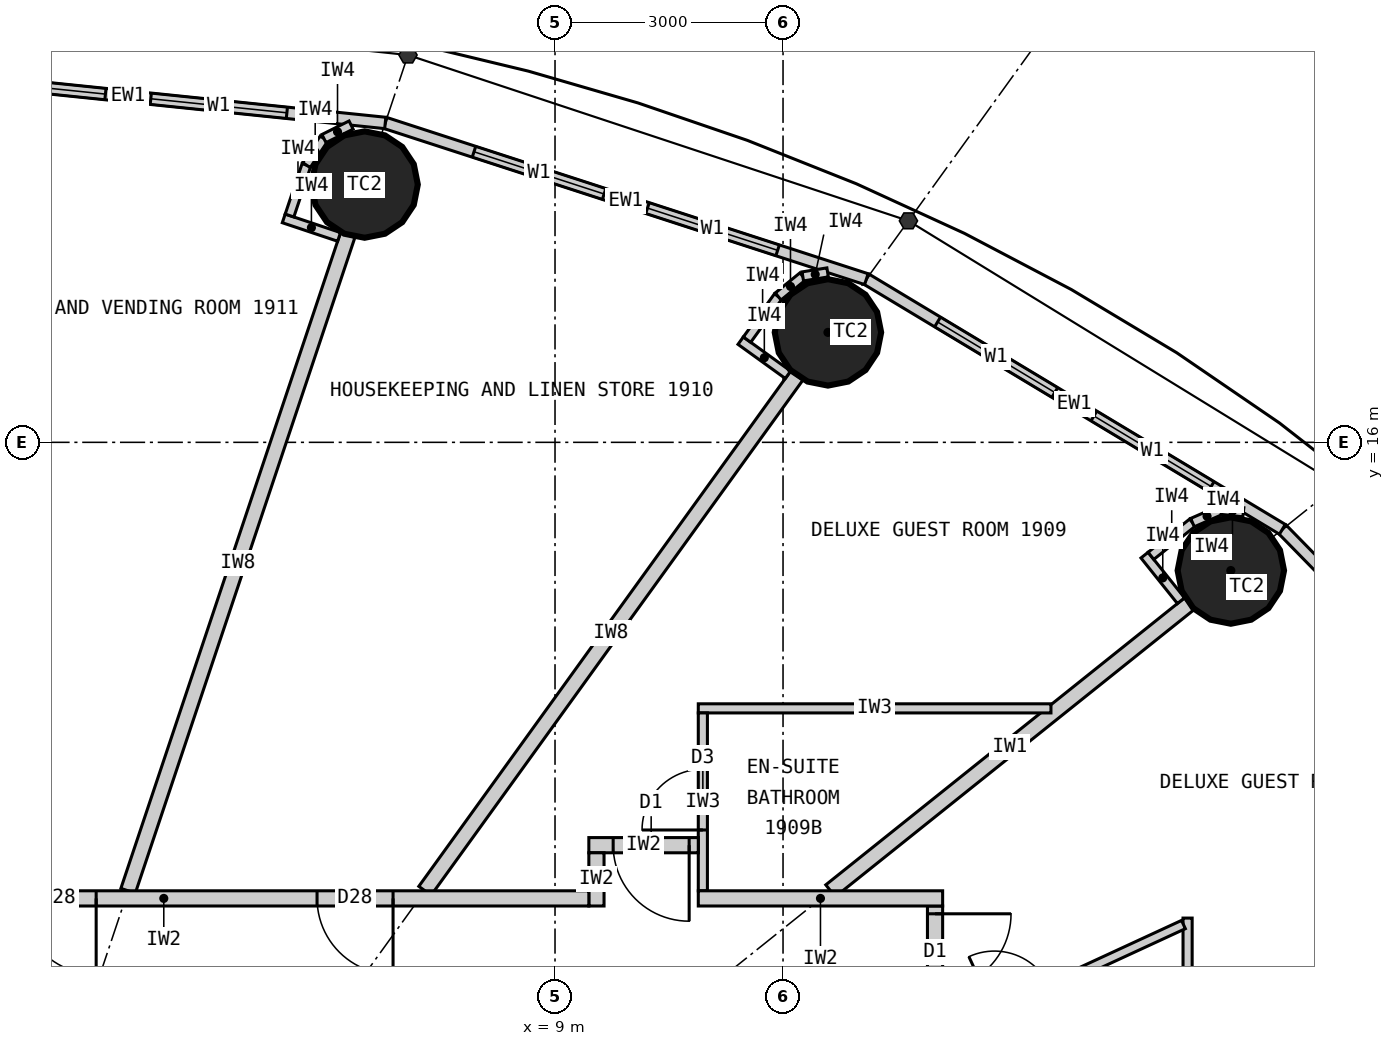
"""IFC4 building model, lengths in metres.
Left out: names, types, materials, properties, quantities, classifications, styles, units other than length and angle.
Written with IfcOpenShell. Run it as: python <this file> out.ifc"""

import sys

from ifc_helpers import new_model, si_unit, direction, frame, frame_2d, origin, origin_2d, place, context, subcontext, project, spatial, rectangle, circle, extrude, element, fill, save


model = new_model("IFC4")
c1 = context("Model", 3, precision=1e-05, world=origin(), true_north=direction((0.0, 1.0)))
c2 = subcontext(c1, "Body", "Model", "MODEL_VIEW")
j1 = project(units=[si_unit("LENGTHUNIT", "METRE"), si_unit("PLANEANGLEUNIT", "RADIAN")], contexts=[c1])
p1 = place(None, origin())
s1 = spatial("IfcSite", under=j1, at=p1, CompositionType="ELEMENT")
p2 = place(p1, origin())
s2 = spatial("IfcBuilding", under=s1, at=p2, CompositionType="ELEMENT")
p3 = place(p2, frame((0.0, 0.0, 77.1)))
s3 = spatial("IfcBuildingStorey", under=s2, at=p3, CompositionType="ELEMENT", Elevation=77.1)
for number, where, z_axis, x_axis in (
    (1, (17.892, 14.313, 0.0), (0.0, 0.0, 1.0), (1.0, 0.0, 0.0)),
    (2, (12.591, 17.447, 0.0), (0.0, 0.0, 1.0), (1.0, 0.0, 0.0)),
    (3, (6.495, 19.391, 0.0), (0.0, 0.0, 1.0), (1.0, 0.0, 0.0)),
):
    element("IfcColumn", number, at=place(p3, frame(where, z_axis=z_axis, x_axis=x_axis)), inside=s3, PredefinedType="COLUMN", context=c2, shape_type="SweptSolid", body=[
        extrude(circle(Radius=0.7, at=origin_2d()), origin(), (0.0, 0.0, 1.0), 3.3),
    ])
p4 = place(p3, frame((22.803, 10.532, 0.0), z_axis=(0.0, 0.0, 1.0), x_axis=(-0.699602905915, 0.714531856557, 0.0)))
e4 = element("IfcWall", 4, at=p4, inside=s3, PredefinedType="ELEMENTEDWALL", context=c2, shape_type="SweptSolid", body=[
    extrude(rectangle(XDim=6.051, YDim=0.15, at=frame_2d((3.025, 0.0))), origin(), (0.0, 0.0, 1.0), 3.12),
])
p5 = place(p4, frame((0.926, 0.0, 0.9)))
e5 = element("IfcOpeningElement", 5, at=p5, cuts=e4, PredefinedType="OPENING", context=c2, shape_type="SweptSolid", body=[
    extrude(rectangle(XDim=1.8, YDim=1.9, at=frame_2d((0.9, 0.95))), frame((0.0, 0.085, 0.0), z_axis=(0.0, -1.0, 0.0), x_axis=(1.0, 0.0, 0.0)), (0.0, 0.0, 1.0), 0.17),
])
p6 = place(p4, frame((3.325, 0.0, 0.9)))
e6 = element("IfcOpeningElement", 6, at=p6, cuts=e4, PredefinedType="OPENING", context=c2, shape_type="SweptSolid", body=[
    extrude(rectangle(XDim=1.8, YDim=1.9, at=frame_2d((0.9, 0.95))), frame((0.0, 0.085, 0.0), z_axis=(0.0, -1.0, 0.0), x_axis=(1.0, 0.0, 0.0)), (0.0, 0.0, 1.0), 0.17),
])
p7 = place(p3, frame((18.57, 14.856, 0.0), z_axis=(0.0, 0.0, 1.0), x_axis=(-0.856983180864, 0.515344377787, 0.0)))
e7 = element("IfcWall", 7, at=p7, inside=s3, PredefinedType="ELEMENTEDWALL", context=c2, shape_type="SweptSolid", body=[
    extrude(rectangle(XDim=6.386, YDim=0.15, at=frame_2d((3.193, 0.0))), origin(), (0.0, 0.0, 1.0), 3.12),
])
p8 = place(p7, frame((1.093, 0.0, 0.9)))
e8 = element("IfcOpeningElement", 8, at=p8, cuts=e7, PredefinedType="OPENING", context=c2, shape_type="SweptSolid", body=[
    extrude(rectangle(XDim=1.8, YDim=1.9, at=frame_2d((0.9, 0.95))), frame((0.0, 0.085, 0.0), z_axis=(0.0, -1.0, 0.0), x_axis=(1.0, 0.0, 0.0)), (0.0, 0.0, 1.0), 0.17),
])
p9 = place(p7, frame((3.493, 0.0, 0.9)))
e9 = element("IfcOpeningElement", 9, at=p9, cuts=e7, PredefinedType="OPENING", context=c2, shape_type="SweptSolid", body=[
    extrude(rectangle(XDim=1.8, YDim=1.9, at=frame_2d((0.9, 0.95))), frame((0.0, 0.085, 0.0), z_axis=(0.0, -1.0, 0.0), x_axis=(1.0, 0.0, 0.0)), (0.0, 0.0, 1.0), 0.17),
])
p10 = place(p3, frame((13.096, 18.147, 0.0), z_axis=(0.0, 0.0, 1.0), x_axis=(-0.951137534625, 0.308767534285, 0.0)))
e10 = element("IfcWall", 10, at=p10, inside=s3, PredefinedType="ELEMENTEDWALL", context=c2, shape_type="SweptSolid", body=[
    extrude(rectangle(XDim=6.655, YDim=0.15, at=frame_2d((3.328, 0.0))), origin(), (0.0, 0.0, 1.0), 3.12),
])
p11 = place(p10, frame((1.228, 0.0, 0.9)))
e11 = element("IfcOpeningElement", 11, at=p11, cuts=e10, PredefinedType="OPENING", context=c2, shape_type="SweptSolid", body=[
    extrude(rectangle(XDim=1.8, YDim=1.9, at=frame_2d((0.9, 0.95))), frame((0.0, 0.085, 0.0), z_axis=(0.0, -1.0, 0.0), x_axis=(1.0, 0.0, 0.0)), (0.0, 0.0, 1.0), 0.17),
])
p12 = place(p10, frame((3.628, 0.0, 0.9)))
e12 = element("IfcOpeningElement", 12, at=p12, cuts=e10, PredefinedType="OPENING", context=c2, shape_type="SweptSolid", body=[
    extrude(rectangle(XDim=1.8, YDim=1.9, at=frame_2d((0.9, 0.95))), frame((0.0, 0.085, 0.0), z_axis=(0.0, -1.0, 0.0), x_axis=(1.0, 0.0, 0.0)), (0.0, 0.0, 1.0), 0.17),
])
p13 = place(p3, frame((6.766, 20.202, 0.0), z_axis=(0.0, 0.0, 1.0), x_axis=(-0.994721394369, 0.102612609291, 0.0)))
e13 = element("IfcWall", 13, at=p13, inside=s3, PredefinedType="ELEMENTEDWALL", context=c2, shape_type="SweptSolid", body=[
    extrude(rectangle(XDim=6.802, YDim=0.15, at=frame_2d((3.401, 0.0))), origin(), (0.0, 0.0, 1.0), 3.12),
])
p14 = place(p13, frame((1.301, 0.0, 0.9)))
e14 = element("IfcOpeningElement", 14, at=p14, cuts=e13, PredefinedType="OPENING", context=c2, shape_type="SweptSolid", body=[
    extrude(rectangle(XDim=1.8, YDim=1.9, at=frame_2d((0.9, 0.95))), frame((0.0, 0.085, 0.0), z_axis=(0.0, -1.0, 0.0), x_axis=(1.0, 0.0, 0.0)), (0.0, 0.0, 1.0), 0.17),
])
p15 = place(p13, frame((3.701, 0.0, 0.9)))
e15 = element("IfcOpeningElement", 15, at=p15, cuts=e13, PredefinedType="OPENING", context=c2, shape_type="SweptSolid", body=[
    extrude(rectangle(XDim=1.8, YDim=1.9, at=frame_2d((0.9, 0.95))), frame((0.0, 0.085, 0.0), z_axis=(0.0, -1.0, 0.0), x_axis=(1.0, 0.0, 0.0)), (0.0, 0.0, 1.0), 0.17),
])
p16 = place(p3, frame((14.1, 6.512, 0.0), z_axis=(0.0, 0.0, 1.0), x_axis=(0.907832871056, 0.419332181247, 0.0)))
e16 = element("IfcWall", 16, at=p16, inside=s3, PredefinedType="PARTITIONING", context=c2, shape_type="SweptSolid", body=[
    extrude(rectangle(XDim=8.023, YDim=0.2, at=frame_2d((4.011, 0.0))), origin(), (0.0, 0.0, 1.0), 2.32),
])
p17 = place(p3, frame((12.625, 10.1, 0.0), z_axis=(0.0, 0.0, 1.0), x_axis=(0.780892451574, 0.624665493744, 0.0)))
e17 = element("IfcWall", 17, at=p17, inside=s3, PredefinedType="PARTITIONING", context=c2, shape_type="SweptSolid", body=[
    extrude(rectangle(XDim=6.045, YDim=0.2, at=frame_2d((3.022, 0.0))), origin(), (0.0, 0.0, 1.0), 2.32),
])
p18 = place(p3, frame((7.289, 10.1, 0.0), z_axis=(0.0, 0.0, 1.0), x_axis=(0.585198353053, 0.810890182197, 0.0)))
e18 = element("IfcWall", 18, at=p18, inside=s3, PredefinedType="PARTITIONING", context=c2, shape_type="SweptSolid", body=[
    extrude(rectangle(XDim=8.36, YDim=0.2, at=frame_2d((4.18, 0.0))), origin(), (0.0, 0.0, 1.0), 2.32),
])
p19 = place(p3, frame((3.383, 10.1, 0.0), z_axis=(0.0, 0.0, 1.0), x_axis=(0.31759592231, 0.948226149256, 0.0)))
e19 = element("IfcWall", 19, at=p19, inside=s3, PredefinedType="PARTITIONING", context=c2, shape_type="SweptSolid", body=[
    extrude(rectangle(XDim=9.098, YDim=0.2, at=frame_2d((4.549, 0.0))), origin(), (0.0, 0.0, 1.0), 2.32),
])
p20 = place(p3, frame((17.323, 8.101, 0.0), z_axis=(0.0, 0.0, 1.0), x_axis=(0.0, 1.0, 0.0)))
e20 = element("IfcWall", 20, at=p20, inside=s3, PredefinedType="PARTITIONING", context=c2, shape_type="SweptSolid", body=[
    extrude(rectangle(XDim=1.64, YDim=0.12, at=frame_2d((0.82, 0.0))), origin(), (0.0, 0.0, 1.0), 3.12),
])
p21 = place(p3, frame((14.1, 8.193, 0.0), z_axis=(0.0, 0.0, 1.0), x_axis=(0.907836493557, 0.419324338628, 0.0)))
e21 = element("IfcWall", 21, at=p21, inside=s3, PredefinedType="PARTITIONING", context=c2, shape_type="SweptSolid", body=[
    extrude(rectangle(XDim=3.49, YDim=0.12, at=frame_2d((1.745, 0.0))), origin(), (0.0, 0.0, 1.0), 3.12),
])
p22 = place(p21, frame((0.75, 0.0, 0.0)))
e22 = element("IfcOpeningElement", 22, at=p22, cuts=e21, PredefinedType="OPENING", context=c2, shape_type="SweptSolid", body=[
    extrude(rectangle(XDim=0.8, YDim=2.1, at=frame_2d((0.4, 1.05))), frame((0.0, 0.07, 0.0), z_axis=(0.0, -1.0, 0.0), x_axis=(1.0, 0.0, 0.0)), (0.0, 0.0, 1.0), 0.14),
])
p23 = place(p3, frame((15.525, 12.5, 0.0), z_axis=(0.0, 0.0, 1.0), x_axis=(-1.0, 0.0, 0.0)))
e23 = element("IfcWall", 23, at=p23, inside=s3, PredefinedType="PARTITIONING", context=c2, shape_type="SweptSolid", body=[
    extrude(rectangle(XDim=4.64, YDim=0.12, at=frame_2d((2.32, 0.0))), origin(), (0.0, 0.0, 1.0), 3.12),
])
p24 = place(p3, frame((10.945, 10.1, 0.0), z_axis=(0.0, 0.0, 1.0), x_axis=(0.0, 1.0, 0.0)))
e24 = element("IfcWall", 24, at=p24, inside=s3, PredefinedType="PARTITIONING", context=c2, shape_type="SweptSolid", body=[
    extrude(rectangle(XDim=2.34, YDim=0.12, at=frame_2d((1.17, 0.0))), origin(), (0.0, 0.0, 1.0), 3.12),
])
p25 = place(p24, frame((0.8, 0.0, 0.0)))
e25 = element("IfcOpeningElement", 25, at=p25, cuts=e24, PredefinedType="OPENING", context=c2, shape_type="SweptSolid", body=[
    extrude(rectangle(XDim=0.8, YDim=2.1, at=frame_2d((0.4, 1.05))), frame((0.0, 0.07, 0.0), z_axis=(0.0, -1.0, 0.0), x_axis=(1.0, 0.0, 0.0)), (0.0, 0.0, 1.0), 0.14),
])
p26 = place(p3, frame((9.445, 10.7, 0.0), z_axis=(0.0, 0.0, 1.0), x_axis=(1.0, 0.0, 0.0)))
e26 = element("IfcWall", 26, at=p26, inside=s3, PredefinedType="PARTITIONING", context=c2, shape_type="SweptSolid", body=[
    extrude(rectangle(XDim=1.44, YDim=0.2, at=frame_2d((0.72, 0.0))), origin(), (0.0, 0.0, 1.0), 3.12),
])
p27 = place(p26, frame((0.32, 0.0, 0.0)))
e27 = element("IfcOpeningElement", 27, at=p27, cuts=e26, PredefinedType="OPENING", context=c2, shape_type="SweptSolid", body=[
    extrude(rectangle(XDim=1.0, YDim=2.2, at=frame_2d((0.5, 1.1))), frame((0.0, 0.11, 0.0), z_axis=(0.0, -1.0, 0.0), x_axis=(1.0, 0.0, 0.0)), (0.0, 0.0, 1.0), 0.22),
])
p28 = place(p3, frame((9.545, 9.9, 0.0), z_axis=(0.0, 0.0, 1.0), x_axis=(0.0, 1.0, 0.0)))
e28 = element("IfcWall", 28, at=p28, inside=s3, PredefinedType="PARTITIONING", context=c2, shape_type="SweptSolid", body=[
    extrude(rectangle(XDim=0.7, YDim=0.2, at=frame_2d((0.35, 0.0))), origin(), (0.0, 0.0, 1.0), 3.12),
])
p29 = place(p3, frame((14.0, 4.772, 0.0), z_axis=(0.0, 0.0, 1.0), x_axis=(0.0, 1.0, 0.0)))
e29 = element("IfcWall", 29, at=p29, inside=s3, PredefinedType="PARTITIONING", context=c2, shape_type="SweptSolid", body=[
    extrude(rectangle(XDim=5.127, YDim=0.2, at=frame_2d((2.564, 0.0))), origin(), (0.0, 0.0, 1.0), 3.12),
])
p30 = place(p29, frame((4.025, 0.0, 0.0)))
e30 = element("IfcOpeningElement", 30, at=p30, cuts=e29, PredefinedType="OPENING", context=c2, shape_type="SweptSolid", body=[
    extrude(rectangle(XDim=1.0, YDim=2.2, at=frame_2d((0.5, 1.1))), frame((0.0, 0.11, 0.0), z_axis=(0.0, -1.0, 0.0), x_axis=(1.0, 0.0, 0.0)), (0.0, 0.0, 1.0), 0.22),
])
p31 = place(p3, frame((-1.74, 10.0, 0.0), z_axis=(0.0, 0.0, 1.0), x_axis=(1.0, 0.0, 0.0)))
e31 = element("IfcWall", 31, at=p31, inside=s3, PredefinedType="PARTITIONING", context=c2, shape_type="SweptSolid", body=[
    extrude(rectangle(XDim=11.185, YDim=0.2, at=frame_2d((5.593, 0.0))), origin(), (0.0, 0.0, 1.0), 3.12),
])
p32 = place(p31, frame((7.609, 0.0, 0.0)))
e32 = element("IfcOpeningElement", 32, at=p32, cuts=e31, PredefinedType="OPENING", context=c2, shape_type="SweptSolid", body=[
    extrude(rectangle(XDim=1.0, YDim=2.2, at=frame_2d((0.5, 1.1))), frame((0.0, 0.11, 0.0), z_axis=(0.0, -1.0, 0.0), x_axis=(1.0, 0.0, 0.0)), (0.0, 0.0, 1.0), 0.22),
])
p33 = place(p31, frame((3.703, 0.0, 0.0)))
e33 = element("IfcOpeningElement", 33, at=p33, cuts=e31, PredefinedType="OPENING", context=c2, shape_type="SweptSolid", body=[
    extrude(rectangle(XDim=1.0, YDim=2.2, at=frame_2d((0.5, 1.1))), frame((0.0, 0.11, 0.0), z_axis=(0.0, -1.0, 0.0), x_axis=(1.0, 0.0, 0.0)), (0.0, 0.0, 1.0), 0.22),
])
p34 = place(p3, frame((10.885, 10.0, 0.0), z_axis=(0.0, 0.0, 1.0), x_axis=(1.0, 0.0, 0.0)))
e34 = element("IfcWall", 34, at=p34, inside=s3, PredefinedType="PARTITIONING", context=c2, shape_type="SweptSolid", body=[
    extrude(rectangle(XDim=3.215, YDim=0.2, at=frame_2d((1.607, 0.0))), origin(), (0.0, 0.0, 1.0), 3.12),
])
p35 = place(p3, frame((17.236, 13.917, 0.0), z_axis=(0.0, 0.0, 1.0), x_axis=(-0.624695047554, 0.780868809443, 0.0)))
e35 = element("IfcWall", 35, at=p35, inside=s3, PredefinedType="PARTITIONING", context=c2, shape_type="SweptSolid", body=[
    extrude(rectangle(XDim=0.768, YDim=0.12, at=frame_2d((0.384, 0.0))), origin(), (0.0, 0.0, 1.0), 3.12),
])
p36 = place(p3, frame((16.841, 14.507, 0.0), z_axis=(0.0, 0.0, 1.0), x_axis=(0.780902834923, 0.62465251333, 0.0)))
e36 = element("IfcWall", 36, at=p36, inside=s3, PredefinedType="PARTITIONING", context=c2, shape_type="SweptSolid", body=[
    extrude(rectangle(XDim=0.7, YDim=0.12, at=frame_2d((0.35, 0.0))), origin(), (0.0, 0.0, 1.0), 3.12),
])
p37 = place(p3, frame((17.387, 14.944, 0.0), z_axis=(0.0, 0.0, 1.0), x_axis=(0.916036698064, 0.401094462441, 0.0)))
e37 = element("IfcWall", 37, at=p37, inside=s3, PredefinedType="PARTITIONING", context=c2, shape_type="SweptSolid", body=[
    extrude(rectangle(XDim=0.418, YDim=0.12, at=frame_2d((0.209, 0.0))), origin(), (0.0, 0.0, 1.0), 3.12),
])
p38 = place(p3, frame((17.77, 15.112, 0.0), z_axis=(0.0, 0.0, 1.0), x_axis=(0.993904401174, -0.110245368731, 0.0)))
e38 = element("IfcWall", 38, at=p38, inside=s3, PredefinedType="PARTITIONING", context=c2, shape_type="SweptSolid", body=[
    extrude(rectangle(XDim=0.288, YDim=0.12, at=frame_2d((0.144, 0.0))), origin(), (0.0, 0.0, 1.0), 3.12),
])
p39 = place(p3, frame((12.065, 16.889, 0.0), z_axis=(0.0, 0.0, 1.0), x_axis=(-0.810821798253, 0.585293098778, 0.0)))
e39 = element("IfcWall", 39, at=p39, inside=s3, PredefinedType="PARTITIONING", context=c2, shape_type="SweptSolid", body=[
    extrude(rectangle(XDim=0.768, YDim=0.12, at=frame_2d((0.384, 0.0))), origin(), (0.0, 0.0, 1.0), 3.12),
])
p40 = place(p3, frame((11.526, 17.351, 0.0), z_axis=(0.0, 0.0, 1.0), x_axis=(0.585223113993, 0.810872312296, 0.0)))
e40 = element("IfcWall", 40, at=p40, inside=s3, PredefinedType="PARTITIONING", context=c2, shape_type="SweptSolid", body=[
    extrude(rectangle(XDim=0.7, YDim=0.12, at=frame_2d((0.35, 0.0))), origin(), (0.0, 0.0, 1.0), 3.12),
])
p41 = place(p3, frame((11.936, 17.919, 0.0), z_axis=(0.0, 0.0, 1.0), x_axis=(0.775023088441, 0.631932917629, 0.0)))
e41 = element("IfcWall", 41, at=p41, inside=s3, PredefinedType="PARTITIONING", context=c2, shape_type="SweptSolid", body=[
    extrude(rectangle(XDim=0.418, YDim=0.12, at=frame_2d((0.209, 0.0))), origin(), (0.0, 0.0, 1.0), 3.12),
])
p42 = place(p3, frame((12.26, 18.183, 0.0), z_axis=(0.0, 0.0, 1.0), x_axis=(0.987218661664, 0.159371622511, 0.0)))
e42 = element("IfcWall", 42, at=p42, inside=s3, PredefinedType="PARTITIONING", context=c2, shape_type="SweptSolid", body=[
    extrude(rectangle(XDim=0.331, YDim=0.12, at=frame_2d((0.166, 0.0))), origin(), (0.0, 0.0, 1.0), 3.12),
])
p43 = place(p3, frame((6.159, 18.702, 0.0), z_axis=(0.0, 0.0, 1.0), x_axis=(-0.948173154049, 0.31775410295, 0.0)))
e43 = element("IfcWall", 43, at=p43, inside=s3, PredefinedType="PARTITIONING", context=c2, shape_type="SweptSolid", body=[
    extrude(rectangle(XDim=0.768, YDim=0.12, at=frame_2d((0.384, 0.0))), origin(), (0.0, 0.0, 1.0), 3.12),
])
p44 = place(p3, frame((5.507, 18.984, 0.0), z_axis=(0.0, 0.0, 1.0), x_axis=(0.317692050622, 0.948193946918, 0.0)))
e44 = element("IfcWall", 44, at=p44, inside=s3, PredefinedType="PARTITIONING", context=c2, shape_type="SweptSolid", body=[
    extrude(rectangle(XDim=0.7, YDim=0.12, at=frame_2d((0.35, 0.0))), origin(), (0.0, 0.0, 1.0), 3.12),
])
p45 = place(p3, frame((5.729, 19.648, 0.0), z_axis=(0.0, 0.0, 1.0), x_axis=(0.552135764955, 0.833754218615, 0.0)))
e45 = element("IfcWall", 45, at=p45, inside=s3, PredefinedType="PARTITIONING", context=c2, shape_type="SweptSolid", body=[
    extrude(rectangle(XDim=0.418, YDim=0.12, at=frame_2d((0.209, 0.0))), origin(), (0.0, 0.0, 1.0), 3.12),
])
p46 = place(p3, frame((5.96, 19.996, 0.0), z_axis=(0.0, 0.0, 1.0), x_axis=(0.895160725913, 0.445743507842, 0.0)))
e46 = element("IfcWall", 46, at=p46, inside=s3, PredefinedType="PARTITIONING", context=c2, shape_type="SweptSolid", body=[
    extrude(rectangle(XDim=0.399, YDim=0.12, at=frame_2d((0.199, 0.0))), origin(), (0.0, 0.0, 1.0), 3.12),
])
p47 = place(p8, origin())
e47 = element("IfcWindow", 47, at=p47, inside=s3, PartitioningType="SINGLE_PANEL", PredefinedType="WINDOW", context=c2, shape_type="SweptSolid", body=[
    extrude(rectangle(XDim=1.8, YDim=1.9, at=frame_2d((0.9, 0.95))), frame((0.0, 0.03, 0.0), z_axis=(0.0, -1.0, 0.0), x_axis=(1.0, 0.0, 0.0)), (0.0, 0.0, 1.0), 0.06),
])
fill(e8, e47)
p48 = place(p9, origin())
e48 = element("IfcWindow", 48, at=p48, inside=s3, PartitioningType="SINGLE_PANEL", PredefinedType="WINDOW", context=c2, shape_type="SweptSolid", body=[
    extrude(rectangle(XDim=1.8, YDim=1.9, at=frame_2d((0.9, 0.95))), frame((0.0, 0.03, 0.0), z_axis=(0.0, -1.0, 0.0), x_axis=(1.0, 0.0, 0.0)), (0.0, 0.0, 1.0), 0.06),
])
fill(e9, e48)
p49 = place(p11, origin())
e49 = element("IfcWindow", 49, at=p49, inside=s3, PartitioningType="SINGLE_PANEL", PredefinedType="WINDOW", context=c2, shape_type="SweptSolid", body=[
    extrude(rectangle(XDim=1.8, YDim=1.9, at=frame_2d((0.9, 0.95))), frame((0.0, 0.03, 0.0), z_axis=(0.0, -1.0, 0.0), x_axis=(1.0, 0.0, 0.0)), (0.0, 0.0, 1.0), 0.06),
])
fill(e11, e49)
p50 = place(p12, origin())
e50 = element("IfcWindow", 50, at=p50, inside=s3, PartitioningType="SINGLE_PANEL", PredefinedType="WINDOW", context=c2, shape_type="SweptSolid", body=[
    extrude(rectangle(XDim=1.8, YDim=1.9, at=frame_2d((0.9, 0.95))), frame((0.0, 0.03, 0.0), z_axis=(0.0, -1.0, 0.0), x_axis=(1.0, 0.0, 0.0)), (0.0, 0.0, 1.0), 0.06),
])
fill(e12, e50)
p51 = place(p14, origin())
e51 = element("IfcWindow", 51, at=p51, inside=s3, PartitioningType="SINGLE_PANEL", PredefinedType="WINDOW", context=c2, shape_type="SweptSolid", body=[
    extrude(rectangle(XDim=1.8, YDim=1.9, at=frame_2d((0.9, 0.95))), frame((0.0, 0.03, 0.0), z_axis=(0.0, -1.0, 0.0), x_axis=(1.0, 0.0, 0.0)), (0.0, 0.0, 1.0), 0.06),
])
fill(e14, e51)
p52 = place(p15, origin())
e52 = element("IfcWindow", 52, at=p52, inside=s3, PartitioningType="SINGLE_PANEL", PredefinedType="WINDOW", context=c2, shape_type="SweptSolid", body=[
    extrude(rectangle(XDim=1.8, YDim=1.9, at=frame_2d((0.9, 0.95))), frame((0.0, 0.03, 0.0), z_axis=(0.0, -1.0, 0.0), x_axis=(1.0, 0.0, 0.0)), (0.0, 0.0, 1.0), 0.06),
])
fill(e15, e52)
p53 = place(p30, origin())
e53 = element("IfcDoor", 53, at=p53, inside=s3, OperationType="SINGLE_SWING_RIGHT", PredefinedType="DOOR", context=c2, shape_type="SweptSolid", body=[
    extrude(rectangle(XDim=1.0, YDim=2.2, at=frame_2d((0.5, 1.1))), frame((0.0, 0.025, 0.0), z_axis=(0.0, -1.0, 0.0), x_axis=(1.0, 0.0, 0.0)), (0.0, 0.0, 1.0), 0.05),
])
fill(e30, e53)
p54 = place(p25, origin())
e54 = element("IfcDoor", 54, at=p54, inside=s3, OperationType="SINGLE_SWING_LEFT", PredefinedType="DOOR", context=c2, shape_type="SweptSolid", body=[
    extrude(rectangle(XDim=0.8, YDim=2.1, at=frame_2d((0.4, 1.05))), frame((0.0, 0.025, 0.0), z_axis=(0.0, -1.0, 0.0), x_axis=(1.0, 0.0, 0.0)), (0.0, 0.0, 1.0), 0.05),
])
fill(e25, e54)
p55 = place(p27, origin())
e55 = element("IfcDoor", 55, at=p55, inside=s3, OperationType="SINGLE_SWING_RIGHT", PredefinedType="DOOR", context=c2, shape_type="SweptSolid", body=[
    extrude(rectangle(XDim=1.0, YDim=2.2, at=frame_2d((0.5, 1.1))), frame((0.0, 0.025, 0.0), z_axis=(0.0, -1.0, 0.0), x_axis=(1.0, 0.0, 0.0)), (0.0, 0.0, 1.0), 0.05),
])
fill(e27, e55)
p56 = place(p32, origin())
e56 = element("IfcDoor", 56, at=p56, inside=s3, OperationType="SINGLE_SWING_RIGHT", PredefinedType="DOOR", context=c2, shape_type="SweptSolid", body=[
    extrude(rectangle(XDim=1.0, YDim=2.2, at=frame_2d((0.5, 1.1))), frame((0.0, 0.025, 0.0), z_axis=(0.0, -1.0, 0.0), x_axis=(1.0, 0.0, 0.0)), (0.0, 0.0, 1.0), 0.05),
])
fill(e32, e56)
p57 = place(p33, origin())
e57 = element("IfcDoor", 57, at=p57, inside=s3, OperationType="SINGLE_SWING_RIGHT", PredefinedType="DOOR", context=c2, shape_type="SweptSolid", body=[
    extrude(rectangle(XDim=1.0, YDim=2.2, at=frame_2d((0.5, 1.1))), frame((0.0, 0.025, 0.0), z_axis=(0.0, -1.0, 0.0), x_axis=(1.0, 0.0, 0.0)), (0.0, 0.0, 1.0), 0.05),
])
fill(e33, e57)
save(model, sys.argv[1])
